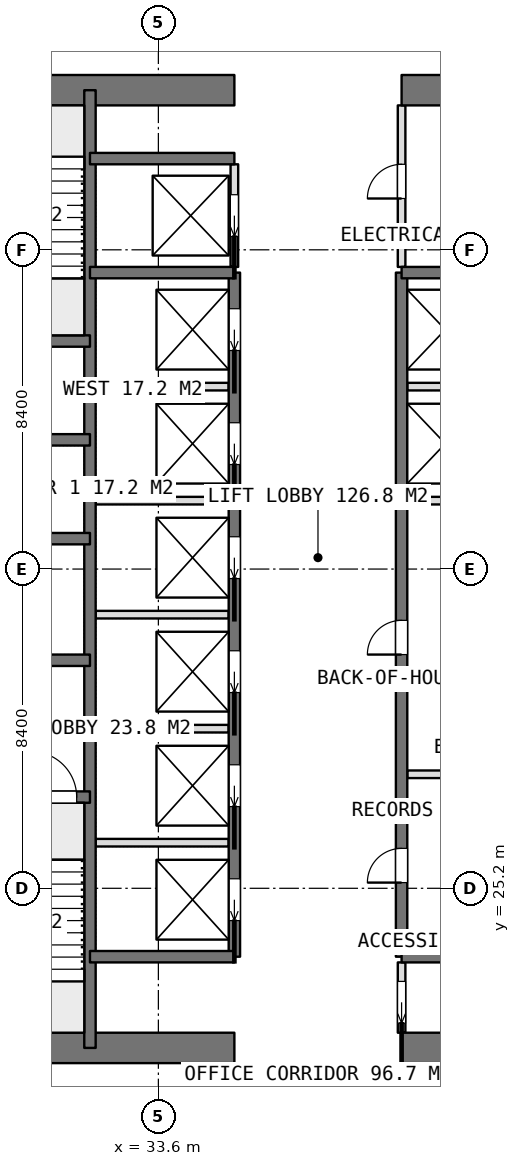
"""IFC4 building model, lengths in metres.
Left out: names, types, materials, properties, quantities, classifications, styles, units other than length and angle.
Written with IfcOpenShell. Run it as: python <this file> out.ifc"""

import sys

from ifc_helpers import new_model, si_unit, direction, frame, frame_2d, origin, place, context, subcontext, project, spatial, rectangle, extrude, element, fill, save


model = new_model("IFC4")
c1 = context("Model", 3, precision=1e-05, world=origin(), true_north=direction((0.0, 1.0)))
c2 = subcontext(c1, "Body", "Model", "MODEL_VIEW")
j1 = project(units=[si_unit("LENGTHUNIT", "METRE"), si_unit("PLANEANGLEUNIT", "RADIAN")], contexts=[c1])
p1 = place(None, origin())
s1 = spatial("IfcSite", under=j1, at=p1, CompositionType="ELEMENT")
p2 = place(p1, origin())
s2 = spatial("IfcBuilding", under=s1, at=p2, CompositionType="ELEMENT")
p3 = place(p2, frame((0.0, 0.0, 265.1)))
s3 = spatial("IfcBuildingStorey", under=s2, at=p3, CompositionType="ELEMENT", Elevation=265.1)
p4 = place(p3, frame((25.2, 21.0, 0.0), z_axis=(0.0, 0.0, 1.0), x_axis=(1.0, 0.0, 0.0)))
e1 = element("IfcWall", 1, at=p4, inside=s3, PredefinedType="SHEAR", context=c2, shape_type="SweptSolid", body=[
    extrude(rectangle(XDim=10.4, YDim=0.8, at=frame_2d((5.2, 0.0))), origin(), (0.0, 0.0, 1.0), 3.75),
])
p5 = place(p3, frame((40.0, 21.0, 0.0), z_axis=(0.0, 0.0, 1.0), x_axis=(1.0, 0.0, 0.0)))
e2 = element("IfcWall", 2, at=p5, inside=s3, PredefinedType="SHEAR", context=c2, shape_type="SweptSolid", body=[
    extrude(rectangle(XDim=10.4, YDim=0.8, at=frame_2d((5.2, 0.0))), origin(), (0.0, 0.0, 1.0), 3.75),
])
p6 = place(p3, frame((25.2, 46.2, 0.0), z_axis=(0.0, 0.0, 1.0), x_axis=(1.0, 0.0, 0.0)))
e3 = element("IfcWall", 3, at=p6, inside=s3, PredefinedType="SHEAR", context=c2, shape_type="SweptSolid", body=[
    extrude(rectangle(XDim=10.4, YDim=0.8, at=frame_2d((5.2, 0.0))), origin(), (0.0, 0.0, 1.0), 3.75),
])
p7 = place(p3, frame((40.0, 46.2, 0.0), z_axis=(0.0, 0.0, 1.0), x_axis=(1.0, 0.0, 0.0)))
e4 = element("IfcWall", 4, at=p7, inside=s3, PredefinedType="SHEAR", context=c2, shape_type="SweptSolid", body=[
    extrude(rectangle(XDim=10.4, YDim=0.8, at=frame_2d((5.2, 0.0))), origin(), (0.0, 0.0, 1.0), 3.75),
])
p8 = place(p3, frame((31.8, 21.0, 0.0), z_axis=(0.0, 0.0, 1.0), x_axis=(0.0, 1.0, 0.0)))
e5 = element("IfcWall", 5, at=p8, inside=s3, PredefinedType="SHEAR", context=c2, shape_type="SweptSolid", body=[
    extrude(rectangle(XDim=25.2, YDim=0.3, at=frame_2d((12.6, 0.0))), origin(), (0.0, 0.0, 1.0), 3.75),
])
p9 = place(p3, frame((35.6, 23.4, 0.0), z_axis=(0.0, 0.0, 1.0), x_axis=(0.0, 1.0, 0.0)))
e6 = element("IfcWall", 6, at=p9, inside=s3, PredefinedType="SHEAR", context=c2, shape_type="SweptSolid", body=[
    extrude(rectangle(XDim=18.0, YDim=0.3, at=frame_2d((9.0, 0.0))), origin(), (0.0, 0.0, 1.0), 3.75),
])
p10 = place(p9, frame((0.95, 0.0, 0.0)))
e7 = element("IfcOpeningElement", 7, at=p10, cuts=e6, PredefinedType="OPENING", context=c2, shape_type="SweptSolid", body=[
    extrude(rectangle(XDim=1.1, YDim=2.1, at=frame_2d((0.55, 1.05))), frame((0.0, 0.16, 0.0), z_axis=(0.0, -1.0, 0.0), x_axis=(1.0, 0.0, 0.0)), (0.0, 0.0, 1.0), 0.32),
])
p11 = place(p9, frame((3.95, 0.0, 0.0)))
e8 = element("IfcOpeningElement", 8, at=p11, cuts=e6, PredefinedType="OPENING", context=c2, shape_type="SweptSolid", body=[
    extrude(rectangle(XDim=1.1, YDim=2.1, at=frame_2d((0.55, 1.05))), frame((0.0, 0.16, 0.0), z_axis=(0.0, -1.0, 0.0), x_axis=(1.0, 0.0, 0.0)), (0.0, 0.0, 1.0), 0.32),
])
p12 = place(p9, frame((6.95, 0.0, 0.0)))
e9 = element("IfcOpeningElement", 9, at=p12, cuts=e6, PredefinedType="OPENING", context=c2, shape_type="SweptSolid", body=[
    extrude(rectangle(XDim=1.1, YDim=2.1, at=frame_2d((0.55, 1.05))), frame((0.0, 0.16, 0.0), z_axis=(0.0, -1.0, 0.0), x_axis=(1.0, 0.0, 0.0)), (0.0, 0.0, 1.0), 0.32),
])
p13 = place(p9, frame((9.95, 0.0, 0.0)))
e10 = element("IfcOpeningElement", 10, at=p13, cuts=e6, PredefinedType="OPENING", context=c2, shape_type="SweptSolid", body=[
    extrude(rectangle(XDim=1.1, YDim=2.1, at=frame_2d((0.55, 1.05))), frame((0.0, 0.16, 0.0), z_axis=(0.0, -1.0, 0.0), x_axis=(1.0, 0.0, 0.0)), (0.0, 0.0, 1.0), 0.32),
])
p14 = place(p9, frame((12.95, 0.0, 0.0)))
e11 = element("IfcOpeningElement", 11, at=p14, cuts=e6, PredefinedType="OPENING", context=c2, shape_type="SweptSolid", body=[
    extrude(rectangle(XDim=1.1, YDim=2.1, at=frame_2d((0.55, 1.05))), frame((0.0, 0.16, 0.0), z_axis=(0.0, -1.0, 0.0), x_axis=(1.0, 0.0, 0.0)), (0.0, 0.0, 1.0), 0.32),
])
p15 = place(p9, frame((15.95, 0.0, 0.0)))
e12 = element("IfcOpeningElement", 12, at=p15, cuts=e6, PredefinedType="OPENING", context=c2, shape_type="SweptSolid", body=[
    extrude(rectangle(XDim=1.1, YDim=2.1, at=frame_2d((0.55, 1.05))), frame((0.0, 0.16, 0.0), z_axis=(0.0, -1.0, 0.0), x_axis=(1.0, 0.0, 0.0)), (0.0, 0.0, 1.0), 0.32),
])
p16 = place(p3, frame((40.0, 23.4, 0.0), z_axis=(0.0, 0.0, 1.0), x_axis=(0.0, 1.0, 0.0)))
e13 = element("IfcWall", 13, at=p16, inside=s3, PredefinedType="SHEAR", context=c2, shape_type="SweptSolid", body=[
    extrude(rectangle(XDim=18.0, YDim=0.3, at=frame_2d((9.0, 0.0))), origin(), (0.0, 0.0, 1.0), 3.75),
])
p17 = place(p16, frame((1.95, 0.0, 0.0)))
e14 = element("IfcOpeningElement", 14, at=p17, cuts=e13, PredefinedType="OPENING", context=c2, shape_type="SweptSolid", body=[
    extrude(rectangle(XDim=0.9, YDim=2.1, at=frame_2d((0.45, 1.05))), frame((0.0, 0.16, 0.0), z_axis=(0.0, -1.0, 0.0), x_axis=(1.0, 0.0, 0.0)), (0.0, 0.0, 1.0), 0.32),
])
p18 = place(p16, frame((7.95, 0.0, 0.0)))
e15 = element("IfcOpeningElement", 15, at=p18, cuts=e13, PredefinedType="OPENING", context=c2, shape_type="SweptSolid", body=[
    extrude(rectangle(XDim=0.9, YDim=2.1, at=frame_2d((0.45, 1.05))), frame((0.0, 0.16, 0.0), z_axis=(0.0, -1.0, 0.0), x_axis=(1.0, 0.0, 0.0)), (0.0, 0.0, 1.0), 0.32),
])
for number, where, z_axis, x_axis in (
    (16, (31.8, 23.4, 0.0), (0.0, 0.0, 1.0), (1.0, 0.0, 0.0)),
    (17, (31.8, 41.4, 0.0), (0.0, 0.0, 1.0), (1.0, 0.0, 0.0)),
    (18, (31.8, 44.4, 0.0), (0.0, 0.0, 1.0), (1.0, 0.0, 0.0)),
    (19, (40.0, 23.4, 0.0), (0.0, 0.0, 1.0), (1.0, 0.0, 0.0)),
    (20, (40.0, 41.4, 0.0), (0.0, 0.0, 1.0), (1.0, 0.0, 0.0)),
):
    element("IfcWall", number, at=place(p3, frame(where, z_axis=z_axis, x_axis=x_axis)), inside=s3, PredefinedType="SHEAR", context=c2, shape_type="SweptSolid", body=[
        extrude(rectangle(XDim=3.8, YDim=0.3, at=frame_2d((1.9, 0.0))), origin(), (0.0, 0.0, 1.0), 3.75),
    ])
p19 = place(p3, frame((25.2, 27.6, 0.0), z_axis=(0.0, 0.0, 1.0), x_axis=(1.0, 0.0, 0.0)))
e21 = element("IfcWall", 21, at=p19, inside=s3, PredefinedType="SHEAR", context=c2, shape_type="SweptSolid", body=[
    extrude(rectangle(XDim=6.6, YDim=0.3, at=frame_2d((3.3, 0.0))), origin(), (0.0, 0.0, 1.0), 3.75),
])
p20 = place(p19, frame((5.05, 0.0, 0.0)))
e22 = element("IfcOpeningElement", 22, at=p20, cuts=e21, PredefinedType="OPENING", context=c2, shape_type="SweptSolid", body=[
    extrude(rectangle(XDim=1.2, YDim=2.1, at=frame_2d((0.6, 1.05))), frame((0.0, 0.16, 0.0), z_axis=(0.0, -1.0, 0.0), x_axis=(1.0, 0.0, 0.0)), (0.0, 0.0, 1.0), 0.32),
])
p21 = place(p3, frame((25.2, 31.2, 0.0), z_axis=(0.0, 0.0, 1.0), x_axis=(1.0, 0.0, 0.0)))
e23 = element("IfcWall", 23, at=p21, inside=s3, PredefinedType="SHEAR", context=c2, shape_type="SweptSolid", body=[
    extrude(rectangle(XDim=6.6, YDim=0.3, at=frame_2d((3.3, 0.0))), origin(), (0.0, 0.0, 1.0), 3.75),
])
p22 = place(p21, frame((2.65, 0.0, 0.0)))
e24 = element("IfcOpeningElement", 24, at=p22, cuts=e23, PredefinedType="OPENING", context=c2, shape_type="SweptSolid", body=[
    extrude(rectangle(XDim=1.3, YDim=2.1, at=frame_2d((0.65, 1.05))), frame((0.0, 0.16, 0.0), z_axis=(0.0, -1.0, 0.0), x_axis=(1.0, 0.0, 0.0)), (0.0, 0.0, 1.0), 0.32),
])
for number, where, z_axis, x_axis in (
    (25, (25.2, 34.4, 0.0), (0.0, 0.0, 1.0), (1.0, 0.0, 0.0)),
    (26, (25.2, 37.0, 0.0), (0.0, 0.0, 1.0), (1.0, 0.0, 0.0)),
    (27, (25.2, 39.6, 0.0), (0.0, 0.0, 1.0), (1.0, 0.0, 0.0)),
):
    element("IfcWall", number, at=place(p3, frame(where, z_axis=z_axis, x_axis=x_axis)), inside=s3, PredefinedType="SHEAR", context=c2, shape_type="SweptSolid", body=[
        extrude(rectangle(XDim=6.6, YDim=0.3, at=frame_2d((3.3, 0.0))), origin(), (0.0, 0.0, 1.0), 3.75),
    ])
for number, where, z_axis, x_axis in (
    (28, (31.95, 26.4, 0.0), (0.0, 0.0, 1.0), (1.0, 0.0, 0.0)),
    (29, (31.95, 29.4, 0.0), (0.0, 0.0, 1.0), (1.0, 0.0, 0.0)),
    (30, (31.95, 32.4, 0.0), (0.0, 0.0, 1.0), (1.0, 0.0, 0.0)),
    (31, (31.95, 35.4, 0.0), (0.0, 0.0, 1.0), (1.0, 0.0, 0.0)),
    (32, (31.95, 38.4, 0.0), (0.0, 0.0, 1.0), (1.0, 0.0, 0.0)),
    (33, (40.15, 35.4, 0.0), (0.0, 0.0, 1.0), (1.0, 0.0, 0.0)),
    (34, (40.15, 38.4, 0.0), (0.0, 0.0, 1.0), (1.0, 0.0, 0.0)),
):
    element("IfcWall", number, at=place(p3, frame(where, z_axis=z_axis, x_axis=x_axis)), inside=s3, PredefinedType="PARTITIONING", context=c2, shape_type="SweptSolid", body=[
        extrude(rectangle(XDim=3.5, YDim=0.2, at=frame_2d((1.75, 0.0))), origin(), (0.0, 0.0, 1.0), 3.5),
    ])
p23 = place(p3, frame((40.0, 21.4, 0.0), z_axis=(0.0, 0.0, 1.0), x_axis=(0.0, 1.0, 0.0)))
e35 = element("IfcWall", 35, at=p23, inside=s3, PredefinedType="PARTITIONING", context=c2, shape_type="SweptSolid", body=[
    extrude(rectangle(XDim=1.85, YDim=0.2, at=frame_2d((0.925, 0.0))), origin(), (0.0, 0.0, 1.0), 3.5),
])
p24 = place(p23, frame((0.25, 0.0, 0.0)))
e36 = element("IfcOpeningElement", 36, at=p24, cuts=e35, PredefinedType="OPENING", context=c2, shape_type="SweptSolid", body=[
    extrude(rectangle(XDim=1.1, YDim=2.1, at=frame_2d((0.55, 1.05))), frame((0.0, 0.11, 0.0), z_axis=(0.0, -1.0, 0.0), x_axis=(1.0, 0.0, 0.0)), (0.0, 0.0, 1.0), 0.22),
])
p25 = place(p3, frame((40.0, 41.55, 0.0), z_axis=(0.0, 0.0, 1.0), x_axis=(0.0, 1.0, 0.0)))
e37 = element("IfcWall", 37, at=p25, inside=s3, PredefinedType="PARTITIONING", context=c2, shape_type="SweptSolid", body=[
    extrude(rectangle(XDim=4.25, YDim=0.2, at=frame_2d((2.125, 0.0))), origin(), (0.0, 0.0, 1.0), 3.5),
])
p26 = place(p25, frame((1.8, 0.0, 0.0)))
e38 = element("IfcOpeningElement", 38, at=p26, cuts=e37, PredefinedType="OPENING", context=c2, shape_type="SweptSolid", body=[
    extrude(rectangle(XDim=0.9, YDim=2.1, at=frame_2d((0.45, 1.05))), frame((0.0, 0.11, 0.0), z_axis=(0.0, -1.0, 0.0), x_axis=(1.0, 0.0, 0.0)), (0.0, 0.0, 1.0), 0.22),
])
p27 = place(p3, frame((35.6, 41.55, 0.0), z_axis=(0.0, 0.0, 1.0), x_axis=(0.0, 1.0, 0.0)))
e39 = element("IfcWall", 39, at=p27, inside=s3, PredefinedType="PARTITIONING", context=c2, shape_type="SweptSolid", body=[
    extrude(rectangle(XDim=2.7, YDim=0.2, at=frame_2d((1.35, 0.0))), origin(), (0.0, 0.0, 1.0), 3.5),
])
p28 = place(p27, frame((0.8, 0.0, 0.0)))
e40 = element("IfcOpeningElement", 40, at=p28, cuts=e39, PredefinedType="OPENING", context=c2, shape_type="SweptSolid", body=[
    extrude(rectangle(XDim=1.1, YDim=2.1, at=frame_2d((0.55, 1.05))), frame((0.0, 0.11, 0.0), z_axis=(0.0, -1.0, 0.0), x_axis=(1.0, 0.0, 0.0)), (0.0, 0.0, 1.0), 0.22),
])
p29 = place(p3, frame((40.15, 28.2, 0.0), z_axis=(0.0, 0.0, 1.0), x_axis=(1.0, 0.0, 0.0)))
e41 = element("IfcWall", 41, at=p29, inside=s3, PredefinedType="PARTITIONING", context=c2, shape_type="SweptSolid", body=[
    extrude(rectangle(XDim=3.5, YDim=0.2, at=frame_2d((1.75, 0.0))), origin(), (0.0, 0.0, 1.0), 3.5),
])
p30 = place(p24, origin())
e42 = element("IfcDoor", 42, at=p30, inside=s3, OperationType="SLIDING_TO_LEFT", PredefinedType="DOOR", context=c2, shape_type="SweptSolid", body=[
    extrude(rectangle(XDim=1.1, YDim=2.1, at=frame_2d((0.55, 1.05))), frame((0.0, 0.025, 0.0), z_axis=(0.0, -1.0, 0.0), x_axis=(1.0, 0.0, 0.0)), (0.0, 0.0, 1.0), 0.05),
])
fill(e36, e42)
p31 = place(p26, origin())
e43 = element("IfcDoor", 43, at=p31, inside=s3, OperationType="SINGLE_SWING_LEFT", PredefinedType="DOOR", context=c2, shape_type="SweptSolid", body=[
    extrude(rectangle(XDim=0.9, YDim=2.1, at=frame_2d((0.45, 1.05))), frame((0.0, 0.025, 0.0), z_axis=(0.0, -1.0, 0.0), x_axis=(1.0, 0.0, 0.0)), (0.0, 0.0, 1.0), 0.05),
])
fill(e38, e43)
p32 = place(p17, origin())
e44 = element("IfcDoor", 44, at=p32, inside=s3, OperationType="SINGLE_SWING_LEFT", PredefinedType="DOOR", context=c2, shape_type="SweptSolid", body=[
    extrude(rectangle(XDim=0.9, YDim=2.1, at=frame_2d((0.45, 1.05))), frame((0.0, 0.025, 0.0), z_axis=(0.0, -1.0, 0.0), x_axis=(1.0, 0.0, 0.0)), (0.0, 0.0, 1.0), 0.05),
])
fill(e14, e44)
p33 = place(p18, origin())
e45 = element("IfcDoor", 45, at=p33, inside=s3, OperationType="SINGLE_SWING_LEFT", PredefinedType="DOOR", context=c2, shape_type="SweptSolid", body=[
    extrude(rectangle(XDim=0.9, YDim=2.1, at=frame_2d((0.45, 1.05))), frame((0.0, 0.025, 0.0), z_axis=(0.0, -1.0, 0.0), x_axis=(1.0, 0.0, 0.0)), (0.0, 0.0, 1.0), 0.05),
])
fill(e15, e45)
p34 = place(p10, origin())
e46 = element("IfcDoor", 46, at=p34, inside=s3, OperationType="SLIDING_TO_LEFT", PredefinedType="USERDEFINED", context=c2, shape_type="SweptSolid", body=[
    extrude(rectangle(XDim=1.1, YDim=2.1, at=frame_2d((0.55, 1.05))), frame((0.0, 0.025, 0.0), z_axis=(0.0, -1.0, 0.0), x_axis=(1.0, 0.0, 0.0)), (0.0, 0.0, 1.0), 0.05),
])
fill(e7, e46)
p35 = place(p11, origin())
e47 = element("IfcDoor", 47, at=p35, inside=s3, OperationType="SLIDING_TO_LEFT", PredefinedType="USERDEFINED", context=c2, shape_type="SweptSolid", body=[
    extrude(rectangle(XDim=1.1, YDim=2.1, at=frame_2d((0.55, 1.05))), frame((0.0, 0.025, 0.0), z_axis=(0.0, -1.0, 0.0), x_axis=(1.0, 0.0, 0.0)), (0.0, 0.0, 1.0), 0.05),
])
fill(e8, e47)
p36 = place(p12, origin())
e48 = element("IfcDoor", 48, at=p36, inside=s3, OperationType="SLIDING_TO_LEFT", PredefinedType="USERDEFINED", context=c2, shape_type="SweptSolid", body=[
    extrude(rectangle(XDim=1.1, YDim=2.1, at=frame_2d((0.55, 1.05))), frame((0.0, 0.025, 0.0), z_axis=(0.0, -1.0, 0.0), x_axis=(1.0, 0.0, 0.0)), (0.0, 0.0, 1.0), 0.05),
])
fill(e9, e48)
p37 = place(p13, origin())
e49 = element("IfcDoor", 49, at=p37, inside=s3, OperationType="SLIDING_TO_LEFT", PredefinedType="USERDEFINED", context=c2, shape_type="SweptSolid", body=[
    extrude(rectangle(XDim=1.1, YDim=2.1, at=frame_2d((0.55, 1.05))), frame((0.0, 0.025, 0.0), z_axis=(0.0, -1.0, 0.0), x_axis=(1.0, 0.0, 0.0)), (0.0, 0.0, 1.0), 0.05),
])
fill(e10, e49)
p38 = place(p14, origin())
e50 = element("IfcDoor", 50, at=p38, inside=s3, OperationType="SLIDING_TO_LEFT", PredefinedType="USERDEFINED", context=c2, shape_type="SweptSolid", body=[
    extrude(rectangle(XDim=1.1, YDim=2.1, at=frame_2d((0.55, 1.05))), frame((0.0, 0.025, 0.0), z_axis=(0.0, -1.0, 0.0), x_axis=(1.0, 0.0, 0.0)), (0.0, 0.0, 1.0), 0.05),
])
fill(e11, e50)
p39 = place(p15, origin())
e51 = element("IfcDoor", 51, at=p39, inside=s3, OperationType="SLIDING_TO_LEFT", PredefinedType="USERDEFINED", context=c2, shape_type="SweptSolid", body=[
    extrude(rectangle(XDim=1.1, YDim=2.1, at=frame_2d((0.55, 1.05))), frame((0.0, 0.025, 0.0), z_axis=(0.0, -1.0, 0.0), x_axis=(1.0, 0.0, 0.0)), (0.0, 0.0, 1.0), 0.05),
])
fill(e12, e51)
p40 = place(p28, origin())
e52 = element("IfcDoor", 52, at=p40, inside=s3, OperationType="SLIDING_TO_LEFT", PredefinedType="USERDEFINED", context=c2, shape_type="SweptSolid", body=[
    extrude(rectangle(XDim=1.1, YDim=2.1, at=frame_2d((0.55, 1.05))), frame((0.0, 0.025, 0.0), z_axis=(0.0, -1.0, 0.0), x_axis=(1.0, 0.0, 0.0)), (0.0, 0.0, 1.0), 0.05),
])
fill(e40, e52)
p41 = place(p20, origin())
e53 = element("IfcDoor", 53, at=p41, inside=s3, OperationType="SINGLE_SWING_RIGHT", PredefinedType="DOOR", context=c2, shape_type="SweptSolid", body=[
    extrude(rectangle(XDim=1.2, YDim=2.1, at=frame_2d((0.6, 1.05))), frame((0.0, 0.025, 0.0), z_axis=(0.0, -1.0, 0.0), x_axis=(1.0, 0.0, 0.0)), (0.0, 0.0, 1.0), 0.05),
])
fill(e22, e53)
save(model, sys.argv[1])
